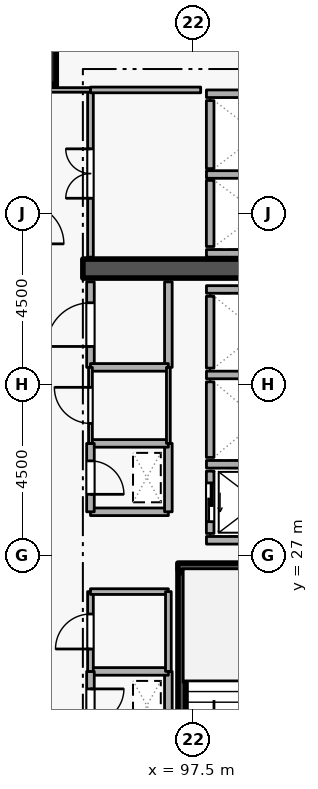
"""IFC4 building model, lengths in metres.
Left out: names, types, materials, properties, quantities, classifications, styles, units other than length and angle.
Written with IfcOpenShell. Run it as: python <this file> out.ifc"""

import sys

from ifc_helpers import new_model, si_unit, direction, frame, frame_2d, origin, origin_2d, place, context, subcontext, project, spatial, rectangle, extrude, element, fill, save


model = new_model("IFC4")
c1 = context("Model", 3, precision=1e-05, world=origin(), true_north=direction((0.0, 1.0)))
c2 = subcontext(c1, "Body", "Model", "MODEL_VIEW")
j1 = project(units=[si_unit("LENGTHUNIT", "METRE"), si_unit("PLANEANGLEUNIT", "RADIAN")], contexts=[c1])
p1 = place(None, origin())
s1 = spatial("IfcSite", under=j1, at=p1, CompositionType="ELEMENT")
p2 = place(p1, origin())
s2 = spatial("IfcBuilding", under=s1, at=p2, CompositionType="ELEMENT")
p3 = place(p2, frame((0.0, 0.0, 119.7)))
s3 = spatial("IfcBuildingStorey", under=s2, at=p3, CompositionType="ELEMENT", Elevation=119.7)
p4 = place(p3, frame((94.6, 34.55, 0.0), z_axis=(0.0, 0.0, 1.0), x_axis=(1.0, 0.0, 0.0)))
e1 = element("IfcWall", 1, at=p4, inside=s3, PredefinedType="SHEAR", context=c2, shape_type="SweptSolid", body=[
    extrude(rectangle(XDim=5.8, YDim=0.5, at=frame_2d((2.9, 0.0))), origin(), (0.0, 0.0, 1.0), 3.6),
])
p5 = place(p3, frame((93.3, 40.0, 0.0), z_axis=(0.0, 0.0, 1.0), x_axis=(1.0, 0.0, 0.0)))
e2 = element("IfcColumn", 2, at=p5, inside=s3, PredefinedType="COLUMN", context=c2, shape_type="SweptSolid", body=[
    extrude(rectangle(XDim=1.2, YDim=1.2, at=origin_2d()), origin(), (0.0, 0.0, 1.0), 3.6),
])
p6 = place(p3, frame((97.95, 29.22, 0.0), z_axis=(0.0, 0.0, 1.0), x_axis=(0.0, -1.0, 0.0)))
e3 = element("IfcWall", 3, at=p6, inside=s3, PredefinedType="STANDARD", context=c2, shape_type="SweptSolid", body=[
    extrude(rectangle(XDim=1.64, YDim=0.2, at=frame_2d((0.82, 0.0))), origin(), (0.0, 0.0, 1.0), 3.32),
])
p7 = place(p6, frame((0.31, 0.0, 0.0)))
e4 = element("IfcOpeningElement", 4, at=p7, cuts=e3, PredefinedType="OPENING", context=c2, shape_type="SweptSolid", body=[
    extrude(rectangle(XDim=1.02, YDim=2.06, at=frame_2d((0.51, 1.03))), frame((0.0, 0.11, 0.0), z_axis=(0.0, -1.0, 0.0), x_axis=(1.0, 0.0, 0.0)), (0.0, 0.0, 1.0), 0.22),
])
p8 = place(p3, frame((97.95, 31.57, 0.0), z_axis=(0.0, 0.0, 1.0), x_axis=(0.0, -1.0, 0.0)))
e5 = element("IfcWall", 5, at=p8, inside=s3, PredefinedType="STANDARD", context=c2, shape_type="SweptSolid", body=[
    extrude(rectangle(XDim=1.99, YDim=0.2, at=frame_2d((0.995, 0.0))), origin(), (0.0, 0.0, 1.0), 3.32),
])
p9 = place(p3, frame((97.95, 33.82, 0.0), z_axis=(0.0, 0.0, 1.0), x_axis=(0.0, -1.0, 0.0)))
e6 = element("IfcWall", 6, at=p9, inside=s3, PredefinedType="STANDARD", context=c2, shape_type="SweptSolid", body=[
    extrude(rectangle(XDim=1.89, YDim=0.2, at=frame_2d((0.945, 0.0))), origin(), (0.0, 0.0, 1.0), 3.32),
])
p10 = place(p3, frame((97.95, 36.87, 0.0), z_axis=(0.0, 0.0, 1.0), x_axis=(0.0, -1.0, 0.0)))
e7 = element("IfcWall", 7, at=p10, inside=s3, PredefinedType="STANDARD", context=c2, shape_type="SweptSolid", body=[
    extrude(rectangle(XDim=1.74, YDim=0.2, at=frame_2d((0.87, 0.0))), origin(), (0.0, 0.0, 1.0), 3.32),
])
p11 = place(p3, frame((97.95, 38.97, 0.0), z_axis=(0.0, 0.0, 1.0), x_axis=(0.0, -1.0, 0.0)))
e8 = element("IfcWall", 8, at=p11, inside=s3, PredefinedType="STANDARD", context=c2, shape_type="SweptSolid", body=[
    extrude(rectangle(XDim=1.79, YDim=0.2, at=frame_2d((0.895, 0.0))), origin(), (0.0, 0.0, 1.0), 3.32),
])
for number, where, z_axis, x_axis in (
    (9, (97.852, 29.4, 0.0), (0.0, 0.0, 1.0), (1.0, 0.0, 0.0)),
    (10, (97.852, 27.4, 0.0), (0.0, 0.0, 1.0), (1.0, 0.0, 0.0)),
    (11, (97.852, 31.75, 0.0), (0.0, 0.0, 1.0), (1.0, 0.0, 0.0)),
    (12, (97.852, 34.0, 0.0), (0.0, 0.0, 1.0), (1.0, 0.0, 0.0)),
):
    element("IfcWall", number, at=place(p3, frame(where, z_axis=z_axis, x_axis=x_axis)), inside=s3, PredefinedType="STANDARD", context=c2, shape_type="SweptSolid", body=[
        extrude(rectangle(XDim=2.536, YDim=0.2, at=frame_2d((1.268, 0.0))), origin(), (0.0, 0.0, 1.0), 3.32),
    ])
p12 = place(p3, frame((97.852, 37.025, 0.0), z_axis=(0.0, 0.0, 1.0), x_axis=(1.0, 0.0, 0.0)))
e13 = element("IfcWall", 13, at=p12, inside=s3, PredefinedType="STANDARD", context=c2, shape_type="SweptSolid", body=[
    extrude(rectangle(XDim=2.746, YDim=0.2, at=frame_2d((1.373, 0.0))), origin(), (0.0, 0.0, 1.0), 3.32),
])
p13 = place(p3, frame((97.852, 34.95, 0.0), z_axis=(0.0, 0.0, 1.0), x_axis=(1.0, 0.0, 0.0)))
e14 = element("IfcWall", 14, at=p13, inside=s3, PredefinedType="STANDARD", context=c2, shape_type="SweptSolid", body=[
    extrude(rectangle(XDim=2.746, YDim=0.2, at=frame_2d((1.373, 0.0))), origin(), (0.0, 0.0, 1.0), 2.525),
])
p14 = place(p3, frame((97.852, 39.15, 0.0), z_axis=(0.0, 0.0, 1.0), x_axis=(1.0, 0.0, 0.0)))
e15 = element("IfcWall", 15, at=p14, inside=s3, PredefinedType="STANDARD", context=c2, shape_type="SweptSolid", body=[
    extrude(rectangle(XDim=2.636, YDim=0.2, at=frame_2d((1.318, 0.0))), origin(), (0.0, 0.0, 1.0), 3.32),
])
p15 = place(p3, frame((97.1, 26.7, 0.0), z_axis=(0.0, 0.0, 1.0), x_axis=(1.0, 0.0, 0.0)))
e16 = element("IfcWall", 16, at=p15, inside=s3, PredefinedType="SHEAR", context=c2, shape_type="SweptSolid", body=[
    extrude(rectangle(XDim=3.35, YDim=0.2, at=frame_2d((1.675, 0.0))), origin(), (0.0, 0.0, 1.0), 3.6),
])
p16 = place(p3, frame((97.203, 26.55, 0.0), z_axis=(0.0, 0.0, 1.0), x_axis=(0.0, -1.0, 0.0)))
e17 = element("IfcWall", 17, at=p16, inside=s3, PredefinedType="SHEAR", context=c2, shape_type="SweptSolid", body=[
    extrude(rectangle(XDim=7.1, YDim=0.2, at=frame_2d((3.55, 0.0))), origin(), (0.0, 0.0, 1.0), 3.6),
])
p17 = place(p3, frame((94.8, 28.15, 0.0), z_axis=(0.0, 0.0, 1.0), x_axis=(1.0, 0.0, 0.0)))
e18 = element("IfcWall", 18, at=p17, inside=s3, PredefinedType="STANDARD", context=c2, shape_type="SweptSolid", body=[
    extrude(rectangle(XDim=2.05, YDim=0.2, at=frame_2d((1.025, 0.0))), origin(), (0.0, 0.0, 1.0), 3.32),
])
p18 = place(p3, frame((96.85, 28.15, 0.0), z_axis=(0.0, 0.0, 1.0), x_axis=(0.0, 1.0, 0.0)))
e19 = element("IfcWall", 19, at=p18, inside=s3, PredefinedType="STANDARD", context=c2, shape_type="SweptSolid", body=[
    extrude(rectangle(XDim=1.8, YDim=0.2, at=frame_2d((0.9, 0.0))), origin(), (0.0, 0.0, 1.0), 3.32),
])
p19 = place(p3, frame((96.85, 29.95, 0.0), z_axis=(0.0, 0.0, 1.0), x_axis=(-1.0, 0.0, 0.0)))
e20 = element("IfcWall", 20, at=p19, inside=s3, PredefinedType="STANDARD", context=c2, shape_type="SweptSolid", body=[
    extrude(rectangle(XDim=2.05, YDim=0.2, at=frame_2d((1.025, 0.0))), origin(), (0.0, 0.0, 1.0), 3.32),
])
p20 = place(p3, frame((94.8, 29.95, 0.0), z_axis=(0.0, 0.0, 1.0), x_axis=(0.0, -1.0, 0.0)))
e21 = element("IfcWall", 21, at=p20, inside=s3, PredefinedType="STANDARD", context=c2, shape_type="SweptSolid", body=[
    extrude(rectangle(XDim=1.8, YDim=0.2, at=frame_2d((0.9, 0.0))), origin(), (0.0, 0.0, 1.0), 3.32),
])
p21 = place(p20, frame((0.46, 0.0, 0.0)))
e22 = element("IfcOpeningElement", 22, at=p21, cuts=e21, PredefinedType="OPENING", context=c2, shape_type="SweptSolid", body=[
    extrude(rectangle(XDim=0.88, YDim=2.04, at=frame_2d((0.44, 1.02))), frame((0.0, 0.11, 0.0), z_axis=(0.0, -1.0, 0.0), x_axis=(1.0, 0.0, 0.0)), (0.0, 0.0, 1.0), 0.22),
])
p22 = place(p3, frame((96.85, 22.15, 0.0), z_axis=(0.0, 0.0, 1.0), x_axis=(0.0, 1.0, 0.0)))
e23 = element("IfcWall", 23, at=p22, inside=s3, PredefinedType="STANDARD", context=c2, shape_type="SweptSolid", body=[
    extrude(rectangle(XDim=1.8, YDim=0.2, at=frame_2d((0.9, 0.0))), origin(), (0.0, 0.0, 1.0), 3.32),
])
p23 = place(p3, frame((96.85, 23.95, 0.0), z_axis=(0.0, 0.0, 1.0), x_axis=(-1.0, 0.0, 0.0)))
e24 = element("IfcWall", 24, at=p23, inside=s3, PredefinedType="STANDARD", context=c2, shape_type="SweptSolid", body=[
    extrude(rectangle(XDim=2.05, YDim=0.2, at=frame_2d((1.025, 0.0))), origin(), (0.0, 0.0, 1.0), 3.32),
])
p24 = place(p3, frame((94.8, 23.95, 0.0), z_axis=(0.0, 0.0, 1.0), x_axis=(0.0, -1.0, 0.0)))
e25 = element("IfcWall", 25, at=p24, inside=s3, PredefinedType="STANDARD", context=c2, shape_type="SweptSolid", body=[
    extrude(rectangle(XDim=1.8, YDim=0.2, at=frame_2d((0.9, 0.0))), origin(), (0.0, 0.0, 1.0), 3.32),
])
p25 = place(p24, frame((0.46, 0.0, 0.0)))
e26 = element("IfcOpeningElement", 26, at=p25, cuts=e25, PredefinedType="OPENING", context=c2, shape_type="SweptSolid", body=[
    extrude(rectangle(XDim=0.88, YDim=2.04, at=frame_2d((0.44, 1.02))), frame((0.0, 0.11, 0.0), z_axis=(0.0, -1.0, 0.0), x_axis=(1.0, 0.0, 0.0)), (0.0, 0.0, 1.0), 0.22),
])
p26 = place(p3, frame((94.8, 31.95, 0.0), z_axis=(0.0, 0.0, 1.0), x_axis=(0.0, 1.0, 0.0)))
e27 = element("IfcWall", 27, at=p26, inside=s3, PredefinedType="STANDARD", context=c2, shape_type="SweptSolid", body=[
    extrude(rectangle(XDim=2.25, YDim=0.2, at=frame_2d((1.125, 0.0))), origin(), (0.0, 0.0, 1.0), 3.32),
])
p27 = place(p26, frame((0.55, 0.0, 0.0)))
e28 = element("IfcOpeningElement", 28, at=p27, cuts=e27, PredefinedType="OPENING", context=c2, shape_type="SweptSolid", body=[
    extrude(rectangle(XDim=1.15, YDim=2.1, at=frame_2d((0.575, 1.05))), frame((0.0, 0.11, 0.0), z_axis=(0.0, -1.0, 0.0), x_axis=(1.0, 0.0, 0.0)), (0.0, 0.0, 1.0), 0.22),
])
p28 = place(p3, frame((96.85, 34.2, 0.0), z_axis=(0.0, 0.0, 1.0), x_axis=(0.0, -1.0, 0.0)))
e29 = element("IfcWall", 29, at=p28, inside=s3, PredefinedType="STANDARD", context=c2, shape_type="SweptSolid", body=[
    extrude(rectangle(XDim=2.25, YDim=0.2, at=frame_2d((1.125, 0.0))), origin(), (0.0, 0.0, 1.0), 3.32),
])
p29 = place(p3, frame((96.85, 31.95, 0.0), z_axis=(0.0, 0.0, 1.0), x_axis=(-1.0, 0.0, 0.0)))
e30 = element("IfcWall", 30, at=p29, inside=s3, PredefinedType="STANDARD", context=c2, shape_type="SweptSolid", body=[
    extrude(rectangle(XDim=2.05, YDim=0.2, at=frame_2d((1.025, 0.0))), origin(), (0.0, 0.0, 1.0), 3.32),
])
p30 = place(p3, frame((94.8, 23.95, 0.0), z_axis=(0.0, 0.0, 1.0), x_axis=(0.0, 1.0, 0.0)))
e31 = element("IfcWall", 31, at=p30, inside=s3, PredefinedType="PARTITIONING", context=c2, shape_type="SweptSolid", body=[
    extrude(rectangle(XDim=2.1, YDim=0.15, at=frame_2d((1.05, 0.0))), origin(), (0.0, 0.0, 1.0), 3.32),
])
p31 = place(p30, frame((0.59, 0.0, 0.0)))
e32 = element("IfcOpeningElement", 32, at=p31, cuts=e31, PredefinedType="OPENING", context=c2, shape_type="SweptSolid", body=[
    extrude(rectangle(XDim=0.92, YDim=2.08, at=frame_2d((0.46, 1.04))), frame((0.0, 0.085, 0.0), z_axis=(0.0, -1.0, 0.0), x_axis=(1.0, 0.0, 0.0)), (0.0, 0.0, 1.0), 0.17),
])
p32 = place(p3, frame((94.8, 26.05, 0.0), z_axis=(0.0, 0.0, 1.0), x_axis=(1.0, 0.0, 0.0)))
e33 = element("IfcWall", 33, at=p32, inside=s3, PredefinedType="PARTITIONING", context=c2, shape_type="SweptSolid", body=[
    extrude(rectangle(XDim=2.05, YDim=0.15, at=frame_2d((1.025, 0.0))), origin(), (0.0, 0.0, 1.0), 3.32),
])
p33 = place(p3, frame((96.85, 26.05, 0.0), z_axis=(0.0, 0.0, 1.0), x_axis=(0.0, -1.0, 0.0)))
e34 = element("IfcWall", 34, at=p33, inside=s3, PredefinedType="PARTITIONING", context=c2, shape_type="SweptSolid", body=[
    extrude(rectangle(XDim=2.1, YDim=0.15, at=frame_2d((1.05, 0.0))), origin(), (0.0, 0.0, 1.0), 3.32),
])
p34 = place(p3, frame((94.8, 29.95, 0.0), z_axis=(0.0, 0.0, 1.0), x_axis=(0.0, 1.0, 0.0)))
e35 = element("IfcWall", 35, at=p34, inside=s3, PredefinedType="PARTITIONING", context=c2, shape_type="SweptSolid", body=[
    extrude(rectangle(XDim=2.0, YDim=0.1, at=frame_2d((1.0, 0.0))), origin(), (0.0, 0.0, 1.0), 3.32),
])
p35 = place(p34, frame((0.525, 0.0, 0.0)))
e36 = element("IfcOpeningElement", 36, at=p35, cuts=e35, PredefinedType="OPENING", context=c2, shape_type="SweptSolid", body=[
    extrude(rectangle(XDim=0.95, YDim=2.1, at=frame_2d((0.475, 1.05))), frame((0.0, 0.06, 0.0), z_axis=(0.0, -1.0, 0.0), x_axis=(1.0, 0.0, 0.0)), (0.0, 0.0, 1.0), 0.12),
])
p36 = place(p3, frame((96.85, 31.95, 0.0), z_axis=(0.0, 0.0, 1.0), x_axis=(0.0, -1.0, 0.0)))
e37 = element("IfcWall", 37, at=p36, inside=s3, PredefinedType="PARTITIONING", context=c2, shape_type="SweptSolid", body=[
    extrude(rectangle(XDim=2.0, YDim=0.1, at=frame_2d((1.0, 0.0))), origin(), (0.0, 0.0, 1.0), 3.32),
])
p37 = place(p3, frame((94.8, 34.85, 0.0), z_axis=(0.0, 0.0, 1.0), x_axis=(0.0, 1.0, 0.0)))
e38 = element("IfcWall", 38, at=p37, inside=s3, PredefinedType="PARTITIONING", context=c2, shape_type="SweptSolid", body=[
    extrude(rectangle(XDim=4.4, YDim=0.15, at=frame_2d((2.2, 0.0))), origin(), (0.0, 0.0, 1.0), 3.32),
])
p38 = place(p37, frame((1.55, 0.0, 0.0)))
e39 = element("IfcOpeningElement", 39, at=p38, cuts=e38, PredefinedType="OPENING", context=c2, shape_type="SweptSolid", body=[
    extrude(rectangle(XDim=1.3, YDim=2.12, at=frame_2d((0.65, 1.06))), frame((0.0, 0.085, 0.0), z_axis=(0.0, -1.0, 0.0), x_axis=(1.0, 0.0, 0.0)), (0.0, 0.0, 1.0), 0.17),
])
p39 = place(p3, frame((94.8, 39.25, 0.0), z_axis=(0.0, 0.0, 1.0), x_axis=(1.0, 0.0, 0.0)))
e40 = element("IfcWall", 40, at=p39, inside=s3, PredefinedType="PARTITIONING", context=c2, shape_type="SweptSolid", body=[
    extrude(rectangle(XDim=2.9, YDim=0.15, at=frame_2d((1.45, 0.0))), origin(), (0.0, 0.0, 1.0), 3.32),
])
p40 = place(p3, frame((94.8, 39.25, 0.0), z_axis=(0.0, 0.0, 1.0), x_axis=(-1.0, 0.0, 0.0)))
e41 = element("IfcWall", 41, at=p40, inside=s3, PredefinedType="PARTITIONING", context=c2, shape_type="SweptSolid", body=[
    extrude(rectangle(XDim=1.75, YDim=0.12, at=frame_2d((0.875, 0.0))), origin(), (0.0, 0.0, 1.0), 3.32),
])
p41 = place(p7, origin())
e42 = element("IfcDoor", 42, at=p41, inside=s3, OperationType="SLIDING_TO_LEFT", PredefinedType="DOOR", context=c2, shape_type="SweptSolid", body=[
    extrude(rectangle(XDim=1.02, YDim=2.06, at=frame_2d((0.51, 1.03))), frame((0.0, 0.025, 0.0), z_axis=(0.0, -1.0, 0.0), x_axis=(1.0, 0.0, 0.0)), (0.0, 0.0, 1.0), 0.05),
])
fill(e4, e42)
p42 = place(p21, origin())
e43 = element("IfcDoor", 43, at=p42, inside=s3, OperationType="SINGLE_SWING_RIGHT", PredefinedType="DOOR", context=c2, shape_type="SweptSolid", body=[
    extrude(rectangle(XDim=0.88, YDim=2.04, at=frame_2d((0.44, 1.02))), frame((0.0, 0.025, 0.0), z_axis=(0.0, -1.0, 0.0), x_axis=(1.0, 0.0, 0.0)), (0.0, 0.0, 1.0), 0.05),
])
fill(e22, e43)
p43 = place(p25, origin())
e44 = element("IfcDoor", 44, at=p43, inside=s3, OperationType="SINGLE_SWING_LEFT", PredefinedType="DOOR", context=c2, shape_type="SweptSolid", body=[
    extrude(rectangle(XDim=0.88, YDim=2.04, at=frame_2d((0.44, 1.02))), frame((0.0, 0.025, 0.0), z_axis=(0.0, -1.0, 0.0), x_axis=(1.0, 0.0, 0.0)), (0.0, 0.0, 1.0), 0.05),
])
fill(e26, e44)
p44 = place(p31, origin())
e45 = element("IfcDoor", 45, at=p44, inside=s3, OperationType="SINGLE_SWING_LEFT", PredefinedType="DOOR", context=c2, shape_type="SweptSolid", body=[
    extrude(rectangle(XDim=0.92, YDim=2.08, at=frame_2d((0.46, 1.04))), frame((0.0, 0.025, 0.0), z_axis=(0.0, -1.0, 0.0), x_axis=(1.0, 0.0, 0.0)), (0.0, 0.0, 1.0), 0.05),
])
fill(e32, e45)
p45 = place(p35, origin())
e46 = element("IfcDoor", 46, at=p45, inside=s3, OperationType="SINGLE_SWING_RIGHT", PredefinedType="DOOR", context=c2, shape_type="SweptSolid", body=[
    extrude(rectangle(XDim=0.95, YDim=2.1, at=frame_2d((0.475, 1.05))), frame((0.0, 0.025, 0.0), z_axis=(0.0, -1.0, 0.0), x_axis=(1.0, 0.0, 0.0)), (0.0, 0.0, 1.0), 0.05),
])
fill(e36, e46)
p46 = place(p27, origin())
e47 = element("IfcDoor", 47, at=p46, inside=s3, OperationType="SINGLE_SWING_LEFT", PredefinedType="DOOR", context=c2, shape_type="SweptSolid", body=[
    extrude(rectangle(XDim=1.15, YDim=2.1, at=frame_2d((0.575, 1.05))), frame((0.0, 0.025, 0.0), z_axis=(0.0, -1.0, 0.0), x_axis=(1.0, 0.0, 0.0)), (0.0, 0.0, 1.0), 0.05),
])
fill(e28, e47)
p47 = place(p38, origin())
e48 = element("IfcDoor", 48, at=p47, inside=s3, OperationType="DOUBLE_DOOR_SINGLE_SWING", PredefinedType="DOOR", context=c2, shape_type="SweptSolid", body=[
    extrude(rectangle(XDim=1.3, YDim=2.12, at=frame_2d((0.65, 1.06))), frame((0.0, 0.025, 0.0), z_axis=(0.0, -1.0, 0.0), x_axis=(1.0, 0.0, 0.0)), (0.0, 0.0, 1.0), 0.05),
])
fill(e39, e48)
save(model, sys.argv[1])
